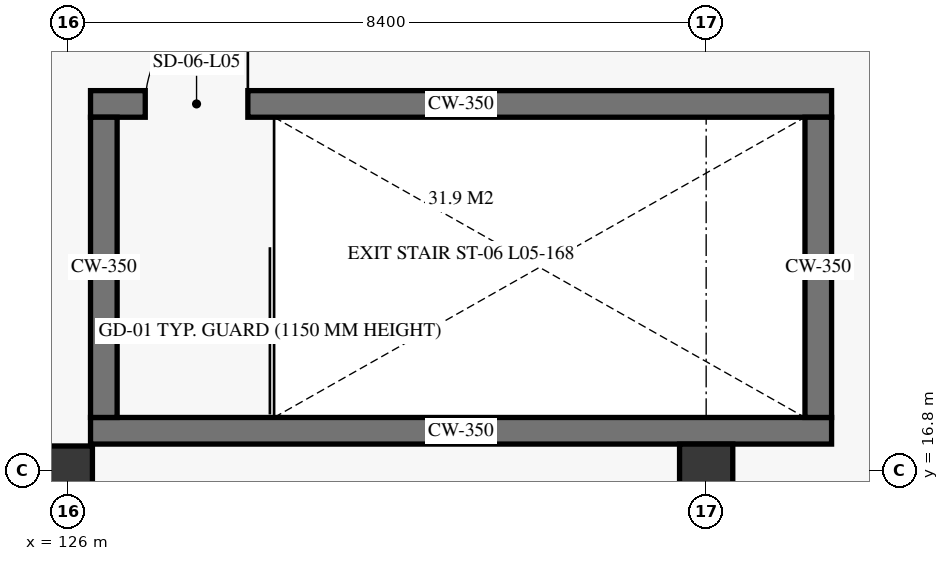
"""IFC4 building model, lengths in metres.
Left out: names, types, materials, properties, quantities, classifications, styles, units other than length and angle.
Written with IfcOpenShell. Run it as: python <this file> out.ifc"""

import sys

from ifc_helpers import new_model, si_unit, direction, frame, frame_2d, origin, origin_2d, place, context, subcontext, project, spatial, rectangle, extrude, element, fill, save


model = new_model("IFC4")
c1 = context("Model", 3, precision=1e-05, world=origin(), true_north=direction((0.0, 1.0)))
c2 = subcontext(c1, "Body", "Model", "MODEL_VIEW")
j1 = project(units=[si_unit("LENGTHUNIT", "METRE"), si_unit("PLANEANGLEUNIT", "RADIAN")], contexts=[c1])
p1 = place(None, origin())
s1 = spatial("IfcSite", under=j1, at=p1, CompositionType="ELEMENT")
p2 = place(p1, origin())
s2 = spatial("IfcBuilding", under=s1, at=p2, CompositionType="ELEMENT")
p3 = place(p2, frame((0.0, 0.0, 22.2)))
s3 = spatial("IfcBuildingStorey", under=s2, at=p3, CompositionType="ELEMENT", Elevation=22.2)
p4 = place(p3, frame((126.0, 16.8, 0.0), z_axis=(0.0, 0.0, 1.0), x_axis=(1.0, 0.0, 0.0)))
e1 = element("IfcColumn", 1, at=p4, inside=s3, PredefinedType="COLUMN", context=c2, shape_type="SweptSolid", body=[
    extrude(rectangle(XDim=0.65, YDim=0.65, at=origin_2d()), origin(), (0.0, 0.0, 1.0), 4.22),
])
p5 = place(p3, frame((134.4, 16.8, 0.0), z_axis=(0.0, 0.0, 1.0), x_axis=(1.0, 0.0, 0.0)))
e2 = element("IfcColumn", 2, at=p5, inside=s3, PredefinedType="COLUMN", context=c2, shape_type="SweptSolid", body=[
    extrude(rectangle(XDim=0.7, YDim=0.7, at=origin_2d()), origin(), (0.0, 0.0, 1.0), 4.22),
])
p6 = place(p3, frame((126.3, 17.325, 0.0), z_axis=(0.0, 0.0, 1.0), x_axis=(1.0, 0.0, 0.0)))
e3 = element("IfcWall", 3, at=p6, inside=s3, PredefinedType="SHEAR", context=c2, shape_type="SweptSolid", body=[
    extrude(rectangle(XDim=9.75, YDim=0.35, at=frame_2d((4.875, 0.0))), origin(), (0.0, 0.0, 1.0), 4.22),
])
p7 = place(p3, frame((126.3, 21.625, 0.0), z_axis=(0.0, 0.0, 1.0), x_axis=(1.0, 0.0, 0.0)))
e4 = element("IfcWall", 4, at=p7, inside=s3, PredefinedType="SHEAR", context=c2, shape_type="SweptSolid", body=[
    extrude(rectangle(XDim=9.75, YDim=0.35, at=frame_2d((4.875, 0.0))), origin(), (0.0, 0.0, 1.0), 4.22),
])
p8 = place(p7, frame((0.72, 0.0, 0.0)))
e5 = element("IfcOpeningElement", 5, at=p8, cuts=e4, PredefinedType="OPENING", context=c2, shape_type="SweptSolid", body=[
    extrude(rectangle(XDim=1.35, YDim=2.25, at=frame_2d((0.675, 1.125))), frame((0.0, 0.185, 0.0), z_axis=(0.0, -1.0, 0.0), x_axis=(1.0, 0.0, 0.0)), (0.0, 0.0, 1.0), 0.37),
])
for number, where, z_axis, x_axis in (
    (6, (126.475, 17.5, 0.0), (0.0, 0.0, 1.0), (0.0, 1.0, 0.0)),
    (7, (135.875, 17.5, 0.0), (0.0, 0.0, 1.0), (0.0, 1.0, 0.0)),
):
    element("IfcWall", number, at=place(p3, frame(where, z_axis=z_axis, x_axis=x_axis)), inside=s3, PredefinedType="SHEAR", context=c2, shape_type="SweptSolid", body=[
        extrude(rectangle(XDim=3.95, YDim=0.35, at=frame_2d((1.975, 0.0))), origin(), (0.0, 0.0, 1.0), 4.22),
    ])
p9 = place(p8, origin())
e8 = element("IfcDoor", 8, at=p9, inside=s3, OperationType="SINGLE_SWING_RIGHT", PredefinedType="DOOR", context=c2, shape_type="SweptSolid", body=[
    extrude(rectangle(XDim=1.35, YDim=2.25, at=frame_2d((0.675, 1.125))), frame((0.0, 0.025, 0.0), z_axis=(0.0, -1.0, 0.0), x_axis=(1.0, 0.0, 0.0)), (0.0, 0.0, 1.0), 0.05),
])
fill(e5, e8)
save(model, sys.argv[1])
